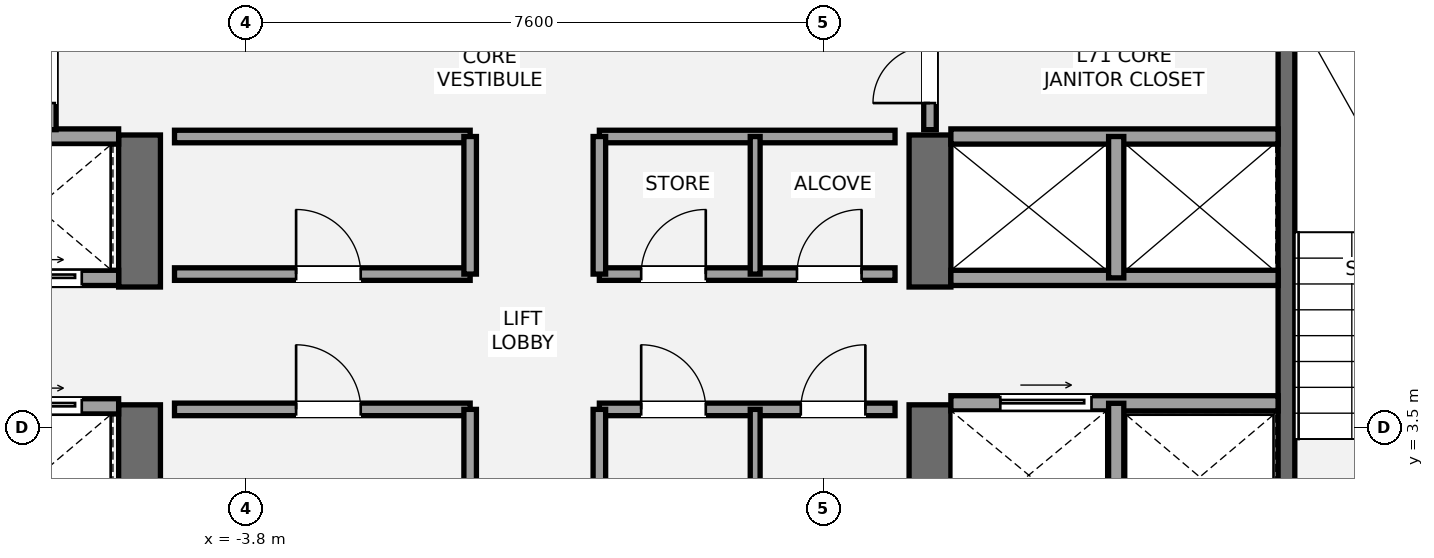
"""IFC4 building model, lengths in metres.
Left out: names, types, materials, properties, quantities, classifications, styles, units other than length and angle.
Written with IfcOpenShell. Run it as: python <this file> out.ifc"""

import sys

from ifc_helpers import new_model, si_unit, direction, frame, frame_2d, origin, place, context, subcontext, project, spatial, rectangle, extrude, element, fill, save


model = new_model("IFC4")
c1 = context("Model", 3, precision=1e-05, world=origin(), true_north=direction((0.0, 1.0)))
c2 = subcontext(c1, "Body", "Model", "MODEL_VIEW")
j1 = project(units=[si_unit("LENGTHUNIT", "METRE"), si_unit("PLANEANGLEUNIT", "RADIAN")], contexts=[c1])
p1 = place(None, origin())
s1 = spatial("IfcSite", under=j1, at=p1, CompositionType="ELEMENT")
p2 = place(p1, origin())
s2 = spatial("IfcBuilding", under=s1, at=p2, CompositionType="ELEMENT")
p3 = place(p2, frame((0.0, 0.0, 250.95)))
s3 = spatial("IfcBuildingStorey", under=s2, at=p3, CompositionType="ELEMENT", Elevation=250.95)
p4 = place(p3, frame((-5.2, 1.3, 0.0), z_axis=(0.0, 0.0, 1.0), x_axis=(0.0, 1.0, 0.0)))
e1 = element("IfcWall", 1, at=p4, inside=s3, PredefinedType="SHEAR", context=c2, shape_type="SweptSolid", body=[
    extrude(rectangle(XDim=2.5, YDim=0.55, at=frame_2d((1.25, 0.0))), origin(), (0.0, 0.0, 1.0), 3.15),
])
p5 = place(p3, frame((-5.2, 5.35, 0.0), z_axis=(0.0, 0.0, 1.0), x_axis=(0.0, 1.0, 0.0)))
e2 = element("IfcWall", 2, at=p5, inside=s3, PredefinedType="SHEAR", context=c2, shape_type="SweptSolid", body=[
    extrude(rectangle(XDim=2.0, YDim=0.55, at=frame_2d((1.0, 0.0))), origin(), (0.0, 0.0, 1.0), 3.15),
])
p6 = place(p3, frame((5.2, 1.3, 0.0), z_axis=(0.0, 0.0, 1.0), x_axis=(0.0, 1.0, 0.0)))
e3 = element("IfcWall", 3, at=p6, inside=s3, PredefinedType="SHEAR", context=c2, shape_type="SweptSolid", body=[
    extrude(rectangle(XDim=2.5, YDim=0.55, at=frame_2d((1.25, 0.0))), origin(), (0.0, 0.0, 1.0), 3.15),
])
p7 = place(p3, frame((5.2, 5.35, 0.0), z_axis=(0.0, 0.0, 1.0), x_axis=(0.0, 1.0, 0.0)))
e4 = element("IfcWall", 4, at=p7, inside=s3, PredefinedType="SHEAR", context=c2, shape_type="SweptSolid", body=[
    extrude(rectangle(XDim=2.0, YDim=0.55, at=frame_2d((1.0, 0.0))), origin(), (0.0, 0.0, 1.0), 3.15),
])
p8 = place(p3, frame((9.89, 1.85, 0.0), z_axis=(0.0, 0.0, 1.0), x_axis=(0.0, 1.0, 0.0)))
e5 = element("IfcWall", 5, at=p8, inside=s3, PredefinedType="SHEAR", context=c2, shape_type="SweptSolid", body=[
    extrude(rectangle(XDim=7.15, YDim=0.22, at=frame_2d((3.575, 0.0))), origin(), (0.0, 0.0, 1.0), 3.15),
])
p9 = place(p3, frame((-9.78, 3.78, 0.0), z_axis=(0.0, 0.0, 1.0), x_axis=(1.0, 0.0, 0.0)))
e6 = element("IfcWall", 6, at=p9, inside=s3, PredefinedType="SOLIDWALL", context=c2, shape_type="SweptSolid", body=[
    extrude(rectangle(XDim=4.305, YDim=0.2, at=frame_2d((2.152, 0.0))), origin(), (0.0, 0.0, 1.0), 2.97),
])
p10 = place(p9, frame((2.72, 0.0, 0.0)))
e7 = element("IfcOpeningElement", 7, at=p10, cuts=e6, PredefinedType="OPENING", context=c2, shape_type="SweptSolid", body=[
    extrude(rectangle(XDim=1.1, YDim=2.2, at=frame_2d((0.55, 1.1))), frame((0.0, 0.11, 0.0), z_axis=(0.0, -1.0, 0.0), x_axis=(1.0, 0.0, 0.0)), (0.0, 0.0, 1.0), 0.22),
])
p11 = place(p3, frame((-9.78, 5.47, 0.0), z_axis=(0.0, 0.0, 1.0), x_axis=(1.0, 0.0, 0.0)))
e8 = element("IfcWall", 8, at=p11, inside=s3, PredefinedType="SOLIDWALL", context=c2, shape_type="SweptSolid", body=[
    extrude(rectangle(XDim=4.305, YDim=0.2, at=frame_2d((2.152, 0.0))), origin(), (0.0, 0.0, 1.0), 2.97),
])
p12 = place(p11, frame((0.55, 0.0, 0.0)))
e9 = element("IfcOpeningElement", 9, at=p12, cuts=e8, PredefinedType="OPENING", context=c2, shape_type="SweptSolid", body=[
    extrude(rectangle(XDim=1.1, YDim=2.2, at=frame_2d((0.55, 1.1))), frame((0.0, 0.11, 0.0), z_axis=(0.0, -1.0, 0.0), x_axis=(1.0, 0.0, 0.0)), (0.0, 0.0, 1.0), 0.22),
])
p13 = place(p11, frame((2.72, 0.0, 0.0)))
e10 = element("IfcOpeningElement", 10, at=p13, cuts=e8, PredefinedType="OPENING", context=c2, shape_type="SweptSolid", body=[
    extrude(rectangle(XDim=1.1, YDim=2.2, at=frame_2d((0.55, 1.1))), frame((0.0, 0.11, 0.0), z_axis=(0.0, -1.0, 0.0), x_axis=(1.0, 0.0, 0.0)), (0.0, 0.0, 1.0), 0.22),
])
p14 = place(p3, frame((-9.78, 7.33, 0.0), z_axis=(0.0, 0.0, 1.0), x_axis=(1.0, 0.0, 0.0)))
e11 = element("IfcWall", 11, at=p14, inside=s3, PredefinedType="SOLIDWALL", context=c2, shape_type="SweptSolid", body=[
    extrude(rectangle(XDim=4.305, YDim=0.2, at=frame_2d((2.152, 0.0))), origin(), (0.0, 0.0, 1.0), 2.97),
])
p15 = place(p3, frame((5.475, 3.82, 0.0), z_axis=(0.0, 0.0, 1.0), x_axis=(1.0, 0.0, 0.0)))
e12 = element("IfcWall", 12, at=p15, inside=s3, PredefinedType="SOLIDWALL", context=c2, shape_type="SweptSolid", body=[
    extrude(rectangle(XDim=4.305, YDim=0.2, at=frame_2d((2.152, 0.0))), origin(), (0.0, 0.0, 1.0), 2.97),
])
p16 = place(p15, frame((0.65, 0.0, 0.0)))
e13 = element("IfcOpeningElement", 13, at=p16, cuts=e12, PredefinedType="OPENING", context=c2, shape_type="SweptSolid", body=[
    extrude(rectangle(XDim=1.2, YDim=2.2, at=frame_2d((0.6, 1.1))), frame((0.0, 0.11, 0.0), z_axis=(0.0, -1.0, 0.0), x_axis=(1.0, 0.0, 0.0)), (0.0, 0.0, 1.0), 0.22),
])
p17 = place(p3, frame((7.65, 1.85, 0.0), z_axis=(0.0, 0.0, 1.0), x_axis=(0.0, 1.0, 0.0)))
e14 = element("IfcWall", 14, at=p17, inside=s3, PredefinedType="SOLIDWALL", context=c2, shape_type="SweptSolid", body=[
    extrude(rectangle(XDim=1.97, YDim=0.2, at=frame_2d((0.985, 0.0))), origin(), (0.0, 0.0, 1.0), 2.97),
])
for number, where, z_axis, x_axis in (
    (15, (5.475, 5.47, 0.0), (0.0, 0.0, 1.0), (1.0, 0.0, 0.0)),
    (16, (5.475, 7.33, 0.0), (0.0, 0.0, 1.0), (1.0, 0.0, 0.0)),
):
    element("IfcWall", number, at=place(p3, frame(where, z_axis=z_axis, x_axis=x_axis)), inside=s3, PredefinedType="SOLIDWALL", context=c2, shape_type="SweptSolid", body=[
        extrude(rectangle(XDim=4.305, YDim=0.2, at=frame_2d((2.152, 0.0))), origin(), (0.0, 0.0, 1.0), 2.97),
    ])
p18 = place(p3, frame((7.65, 5.47, 0.0), z_axis=(0.0, 0.0, 1.0), x_axis=(0.0, 1.0, 0.0)))
e17 = element("IfcWall", 17, at=p18, inside=s3, PredefinedType="SOLIDWALL", context=c2, shape_type="SweptSolid", body=[
    extrude(rectangle(XDim=1.86, YDim=0.2, at=frame_2d((0.93, 0.0))), origin(), (0.0, 0.0, 1.0), 2.97),
])
p19 = place(p3, frame((-4.74, 3.74, 0.0), z_axis=(0.0, 0.0, 1.0), x_axis=(1.0, 0.0, 0.0)))
e18 = element("IfcWall", 18, at=p19, inside=s3, PredefinedType="PARTITIONING", context=c2, shape_type="SweptSolid", body=[
    extrude(rectangle(XDim=3.89, YDim=0.165, at=frame_2d((1.945, 0.0))), origin(), (0.0, 0.0, 1.0), 2.97),
])
p20 = place(p19, frame((1.6, 0.0, 0.0)))
e19 = element("IfcOpeningElement", 19, at=p20, cuts=e18, PredefinedType="OPENING", context=c2, shape_type="SweptSolid", body=[
    extrude(rectangle(XDim=0.85, YDim=2.1, at=frame_2d((0.425, 1.05))), frame((0.0, 0.093, 0.0), z_axis=(0.0, -1.0, 0.0), x_axis=(1.0, 0.0, 0.0)), (0.0, 0.0, 1.0), 0.185),
])
p21 = place(p3, frame((-0.85, 1.92, 0.0), z_axis=(0.0, 0.0, 1.0), x_axis=(0.0, 1.0, 0.0)))
e20 = element("IfcWall", 20, at=p21, inside=s3, PredefinedType="PARTITIONING", context=c2, shape_type="SweptSolid", body=[
    extrude(rectangle(XDim=1.82, YDim=0.165, at=frame_2d((0.91, 0.0))), origin(), (0.0, 0.0, 1.0), 2.97),
])
p22 = place(p3, frame((0.85, 3.74, 0.0), z_axis=(0.0, 0.0, 1.0), x_axis=(1.0, 0.0, 0.0)))
e21 = element("IfcWall", 21, at=p22, inside=s3, PredefinedType="PARTITIONING", context=c2, shape_type="SweptSolid", body=[
    extrude(rectangle(XDim=3.89, YDim=0.165, at=frame_2d((1.945, 0.0))), origin(), (0.0, 0.0, 1.0), 2.97),
])
p23 = place(p22, frame((0.55, 0.0, 0.0)))
e22 = element("IfcOpeningElement", 22, at=p23, cuts=e21, PredefinedType="OPENING", context=c2, shape_type="SweptSolid", body=[
    extrude(rectangle(XDim=0.85, YDim=2.1, at=frame_2d((0.425, 1.05))), frame((0.0, 0.093, 0.0), z_axis=(0.0, -1.0, 0.0), x_axis=(1.0, 0.0, 0.0)), (0.0, 0.0, 1.0), 0.185),
])
p24 = place(p22, frame((2.65, 0.0, 0.0)))
e23 = element("IfcOpeningElement", 23, at=p24, cuts=e21, PredefinedType="OPENING", context=c2, shape_type="SweptSolid", body=[
    extrude(rectangle(XDim=0.85, YDim=2.1, at=frame_2d((0.425, 1.05))), frame((0.0, 0.093, 0.0), z_axis=(0.0, -1.0, 0.0), x_axis=(1.0, 0.0, 0.0)), (0.0, 0.0, 1.0), 0.185),
])
p25 = place(p3, frame((0.85, 1.92, 0.0), z_axis=(0.0, 0.0, 1.0), x_axis=(0.0, 1.0, 0.0)))
e24 = element("IfcWall", 24, at=p25, inside=s3, PredefinedType="PARTITIONING", context=c2, shape_type="SweptSolid", body=[
    extrude(rectangle(XDim=1.82, YDim=0.165, at=frame_2d((0.91, 0.0))), origin(), (0.0, 0.0, 1.0), 2.97),
])
p26 = place(p3, frame((2.9, 1.92, 0.0), z_axis=(0.0, 0.0, 1.0), x_axis=(0.0, 1.0, 0.0)))
e25 = element("IfcWall", 25, at=p26, inside=s3, PredefinedType="PARTITIONING", context=c2, shape_type="SweptSolid", body=[
    extrude(rectangle(XDim=1.82, YDim=0.13, at=frame_2d((0.91, 0.0))), origin(), (0.0, 0.0, 1.0), 2.97),
])
p27 = place(p3, frame((-4.74, 5.52, 0.0), z_axis=(0.0, 0.0, 1.0), x_axis=(1.0, 0.0, 0.0)))
e26 = element("IfcWall", 26, at=p27, inside=s3, PredefinedType="PARTITIONING", context=c2, shape_type="SweptSolid", body=[
    extrude(rectangle(XDim=3.89, YDim=0.165, at=frame_2d((1.945, 0.0))), origin(), (0.0, 0.0, 1.0), 2.97),
])
p28 = place(p27, frame((1.6, 0.0, 0.0)))
e27 = element("IfcOpeningElement", 27, at=p28, cuts=e26, PredefinedType="OPENING", context=c2, shape_type="SweptSolid", body=[
    extrude(rectangle(XDim=0.85, YDim=2.1, at=frame_2d((0.425, 1.05))), frame((0.0, 0.093, 0.0), z_axis=(0.0, -1.0, 0.0), x_axis=(1.0, 0.0, 0.0)), (0.0, 0.0, 1.0), 0.185),
])
p29 = place(p3, frame((-4.74, 7.33, 0.0), z_axis=(0.0, 0.0, 1.0), x_axis=(1.0, 0.0, 0.0)))
e28 = element("IfcWall", 28, at=p29, inside=s3, PredefinedType="PARTITIONING", context=c2, shape_type="SweptSolid", body=[
    extrude(rectangle(XDim=3.89, YDim=0.165, at=frame_2d((1.945, 0.0))), origin(), (0.0, 0.0, 1.0), 2.97),
])
p30 = place(p3, frame((-0.85, 5.52, 0.0), z_axis=(0.0, 0.0, 1.0), x_axis=(0.0, 1.0, 0.0)))
e29 = element("IfcWall", 29, at=p30, inside=s3, PredefinedType="PARTITIONING", context=c2, shape_type="SweptSolid", body=[
    extrude(rectangle(XDim=1.81, YDim=0.165, at=frame_2d((0.905, 0.0))), origin(), (0.0, 0.0, 1.0), 2.97),
])
p31 = place(p3, frame((0.85, 5.52, 0.0), z_axis=(0.0, 0.0, 1.0), x_axis=(1.0, 0.0, 0.0)))
e30 = element("IfcWall", 30, at=p31, inside=s3, PredefinedType="PARTITIONING", context=c2, shape_type="SweptSolid", body=[
    extrude(rectangle(XDim=3.89, YDim=0.165, at=frame_2d((1.945, 0.0))), origin(), (0.0, 0.0, 1.0), 2.97),
])
p32 = place(p31, frame((0.55, 0.0, 0.0)))
e31 = element("IfcOpeningElement", 31, at=p32, cuts=e30, PredefinedType="OPENING", context=c2, shape_type="SweptSolid", body=[
    extrude(rectangle(XDim=0.85, YDim=2.1, at=frame_2d((0.425, 1.05))), frame((0.0, 0.093, 0.0), z_axis=(0.0, -1.0, 0.0), x_axis=(1.0, 0.0, 0.0)), (0.0, 0.0, 1.0), 0.185),
])
p33 = place(p31, frame((2.6, 0.0, 0.0)))
e32 = element("IfcOpeningElement", 32, at=p33, cuts=e30, PredefinedType="OPENING", context=c2, shape_type="SweptSolid", body=[
    extrude(rectangle(XDim=0.85, YDim=2.1, at=frame_2d((0.425, 1.05))), frame((0.0, 0.093, 0.0), z_axis=(0.0, -1.0, 0.0), x_axis=(1.0, 0.0, 0.0)), (0.0, 0.0, 1.0), 0.185),
])
p34 = place(p3, frame((0.85, 7.33, 0.0), z_axis=(0.0, 0.0, 1.0), x_axis=(1.0, 0.0, 0.0)))
e33 = element("IfcWall", 33, at=p34, inside=s3, PredefinedType="PARTITIONING", context=c2, shape_type="SweptSolid", body=[
    extrude(rectangle(XDim=3.89, YDim=0.165, at=frame_2d((1.945, 0.0))), origin(), (0.0, 0.0, 1.0), 2.97),
])
p35 = place(p3, frame((0.85, 5.52, 0.0), z_axis=(0.0, 0.0, 1.0), x_axis=(0.0, 1.0, 0.0)))
e34 = element("IfcWall", 34, at=p35, inside=s3, PredefinedType="PARTITIONING", context=c2, shape_type="SweptSolid", body=[
    extrude(rectangle(XDim=1.81, YDim=0.165, at=frame_2d((0.905, 0.0))), origin(), (0.0, 0.0, 1.0), 2.97),
])
p36 = place(p3, frame((2.9, 5.52, 0.0), z_axis=(0.0, 0.0, 1.0), x_axis=(0.0, 1.0, 0.0)))
e35 = element("IfcWall", 35, at=p36, inside=s3, PredefinedType="PARTITIONING", context=c2, shape_type="SweptSolid", body=[
    extrude(rectangle(XDim=1.81, YDim=0.13, at=frame_2d((0.905, 0.0))), origin(), (0.0, 0.0, 1.0), 2.97),
])
p37 = place(p3, frame((-6.38, 7.42, 0.0), z_axis=(0.0, 0.0, 1.0), x_axis=(0.0, 1.0, 0.0)))
e36 = element("IfcWall", 36, at=p37, inside=s3, PredefinedType="PARTITIONING", context=c2, shape_type="SweptSolid", body=[
    extrude(rectangle(XDim=1.58, YDim=0.165, at=frame_2d((0.79, 0.0))), origin(), (0.0, 0.0, 1.0), 2.97),
])
p38 = place(p37, frame((0.35, 0.0, 0.0)))
e37 = element("IfcOpeningElement", 37, at=p38, cuts=e36, PredefinedType="OPENING", context=c2, shape_type="SweptSolid", body=[
    extrude(rectangle(XDim=0.75, YDim=2.1, at=frame_2d((0.375, 1.05))), frame((0.0, 0.093, 0.0), z_axis=(0.0, -1.0, 0.0), x_axis=(1.0, 0.0, 0.0)), (0.0, 0.0, 1.0), 0.185),
])
p39 = place(p3, frame((5.2, 7.42, 0.0), z_axis=(0.0, 0.0, 1.0), x_axis=(0.0, 1.0, 0.0)))
e38 = element("IfcWall", 38, at=p39, inside=s3, PredefinedType="PARTITIONING", context=c2, shape_type="SweptSolid", body=[
    extrude(rectangle(XDim=1.58, YDim=0.165, at=frame_2d((0.79, 0.0))), origin(), (0.0, 0.0, 1.0), 2.97),
])
p40 = place(p39, frame((0.35, 0.0, 0.0)))
e39 = element("IfcOpeningElement", 39, at=p40, cuts=e38, PredefinedType="OPENING", context=c2, shape_type="SweptSolid", body=[
    extrude(rectangle(XDim=0.75, YDim=2.1, at=frame_2d((0.375, 1.05))), frame((0.0, 0.093, 0.0), z_axis=(0.0, -1.0, 0.0), x_axis=(1.0, 0.0, 0.0)), (0.0, 0.0, 1.0), 0.185),
])
p41 = place(p13, origin())
e40 = element("IfcDoor", 40, at=p41, inside=s3, OperationType="SLIDING_TO_LEFT", PredefinedType="DOOR", context=c2, shape_type="SweptSolid", body=[
    extrude(rectangle(XDim=1.1, YDim=2.2, at=frame_2d((0.55, 1.1))), frame((0.0, 0.025, 0.0), z_axis=(0.0, -1.0, 0.0), x_axis=(1.0, 0.0, 0.0)), (0.0, 0.0, 1.0), 0.05),
])
fill(e10, e40)
p42 = place(p10, origin())
e41 = element("IfcDoor", 41, at=p42, inside=s3, OperationType="SLIDING_TO_LEFT", PredefinedType="DOOR", context=c2, shape_type="SweptSolid", body=[
    extrude(rectangle(XDim=1.1, YDim=2.2, at=frame_2d((0.55, 1.1))), frame((0.0, 0.025, 0.0), z_axis=(0.0, -1.0, 0.0), x_axis=(1.0, 0.0, 0.0)), (0.0, 0.0, 1.0), 0.05),
])
fill(e7, e41)
p43 = place(p16, origin())
e42 = element("IfcDoor", 42, at=p43, inside=s3, OperationType="SLIDING_TO_RIGHT", PredefinedType="DOOR", context=c2, shape_type="SweptSolid", body=[
    extrude(rectangle(XDim=1.2, YDim=2.2, at=frame_2d((0.6, 1.1))), frame((0.0, 0.025, 0.0), z_axis=(0.0, -1.0, 0.0), x_axis=(1.0, 0.0, 0.0)), (0.0, 0.0, 1.0), 0.05),
])
fill(e13, e42)
p44 = place(p20, origin())
e43 = element("IfcDoor", 43, at=p44, inside=s3, OperationType="SINGLE_SWING_LEFT", PredefinedType="DOOR", context=c2, shape_type="SweptSolid", body=[
    extrude(rectangle(XDim=0.85, YDim=2.1, at=frame_2d((0.425, 1.05))), frame((0.0, 0.025, 0.0), z_axis=(0.0, -1.0, 0.0), x_axis=(1.0, 0.0, 0.0)), (0.0, 0.0, 1.0), 0.05),
])
fill(e19, e43)
p45 = place(p23, origin())
e44 = element("IfcDoor", 44, at=p45, inside=s3, OperationType="SINGLE_SWING_LEFT", PredefinedType="DOOR", context=c2, shape_type="SweptSolid", body=[
    extrude(rectangle(XDim=0.85, YDim=2.1, at=frame_2d((0.425, 1.05))), frame((0.0, 0.025, 0.0), z_axis=(0.0, -1.0, 0.0), x_axis=(1.0, 0.0, 0.0)), (0.0, 0.0, 1.0), 0.05),
])
fill(e22, e44)
p46 = place(p24, origin())
e45 = element("IfcDoor", 45, at=p46, inside=s3, OperationType="SINGLE_SWING_RIGHT", PredefinedType="DOOR", context=c2, shape_type="SweptSolid", body=[
    extrude(rectangle(XDim=0.85, YDim=2.1, at=frame_2d((0.425, 1.05))), frame((0.0, 0.025, 0.0), z_axis=(0.0, -1.0, 0.0), x_axis=(1.0, 0.0, 0.0)), (0.0, 0.0, 1.0), 0.05),
])
fill(e23, e45)
p47 = place(p28, origin())
e46 = element("IfcDoor", 46, at=p47, inside=s3, OperationType="SINGLE_SWING_LEFT", PredefinedType="DOOR", context=c2, shape_type="SweptSolid", body=[
    extrude(rectangle(XDim=0.85, YDim=2.1, at=frame_2d((0.425, 1.05))), frame((0.0, 0.025, 0.0), z_axis=(0.0, -1.0, 0.0), x_axis=(1.0, 0.0, 0.0)), (0.0, 0.0, 1.0), 0.05),
])
fill(e27, e46)
p48 = place(p32, origin())
e47 = element("IfcDoor", 47, at=p48, inside=s3, OperationType="SINGLE_SWING_RIGHT", PredefinedType="DOOR", context=c2, shape_type="SweptSolid", body=[
    extrude(rectangle(XDim=0.85, YDim=2.1, at=frame_2d((0.425, 1.05))), frame((0.0, 0.025, 0.0), z_axis=(0.0, -1.0, 0.0), x_axis=(1.0, 0.0, 0.0)), (0.0, 0.0, 1.0), 0.05),
])
fill(e31, e47)
p49 = place(p33, origin())
e48 = element("IfcDoor", 48, at=p49, inside=s3, OperationType="SINGLE_SWING_RIGHT", PredefinedType="DOOR", context=c2, shape_type="SweptSolid", body=[
    extrude(rectangle(XDim=0.85, YDim=2.1, at=frame_2d((0.425, 1.05))), frame((0.0, 0.025, 0.0), z_axis=(0.0, -1.0, 0.0), x_axis=(1.0, 0.0, 0.0)), (0.0, 0.0, 1.0), 0.05),
])
fill(e32, e48)
p50 = place(p40, origin())
e49 = element("IfcDoor", 49, at=p50, inside=s3, OperationType="SINGLE_SWING_LEFT", PredefinedType="DOOR", context=c2, shape_type="SweptSolid", body=[
    extrude(rectangle(XDim=0.75, YDim=2.1, at=frame_2d((0.375, 1.05))), frame((0.0, 0.025, 0.0), z_axis=(0.0, -1.0, 0.0), x_axis=(1.0, 0.0, 0.0)), (0.0, 0.0, 1.0), 0.05),
])
fill(e39, e49)
save(model, sys.argv[1])
